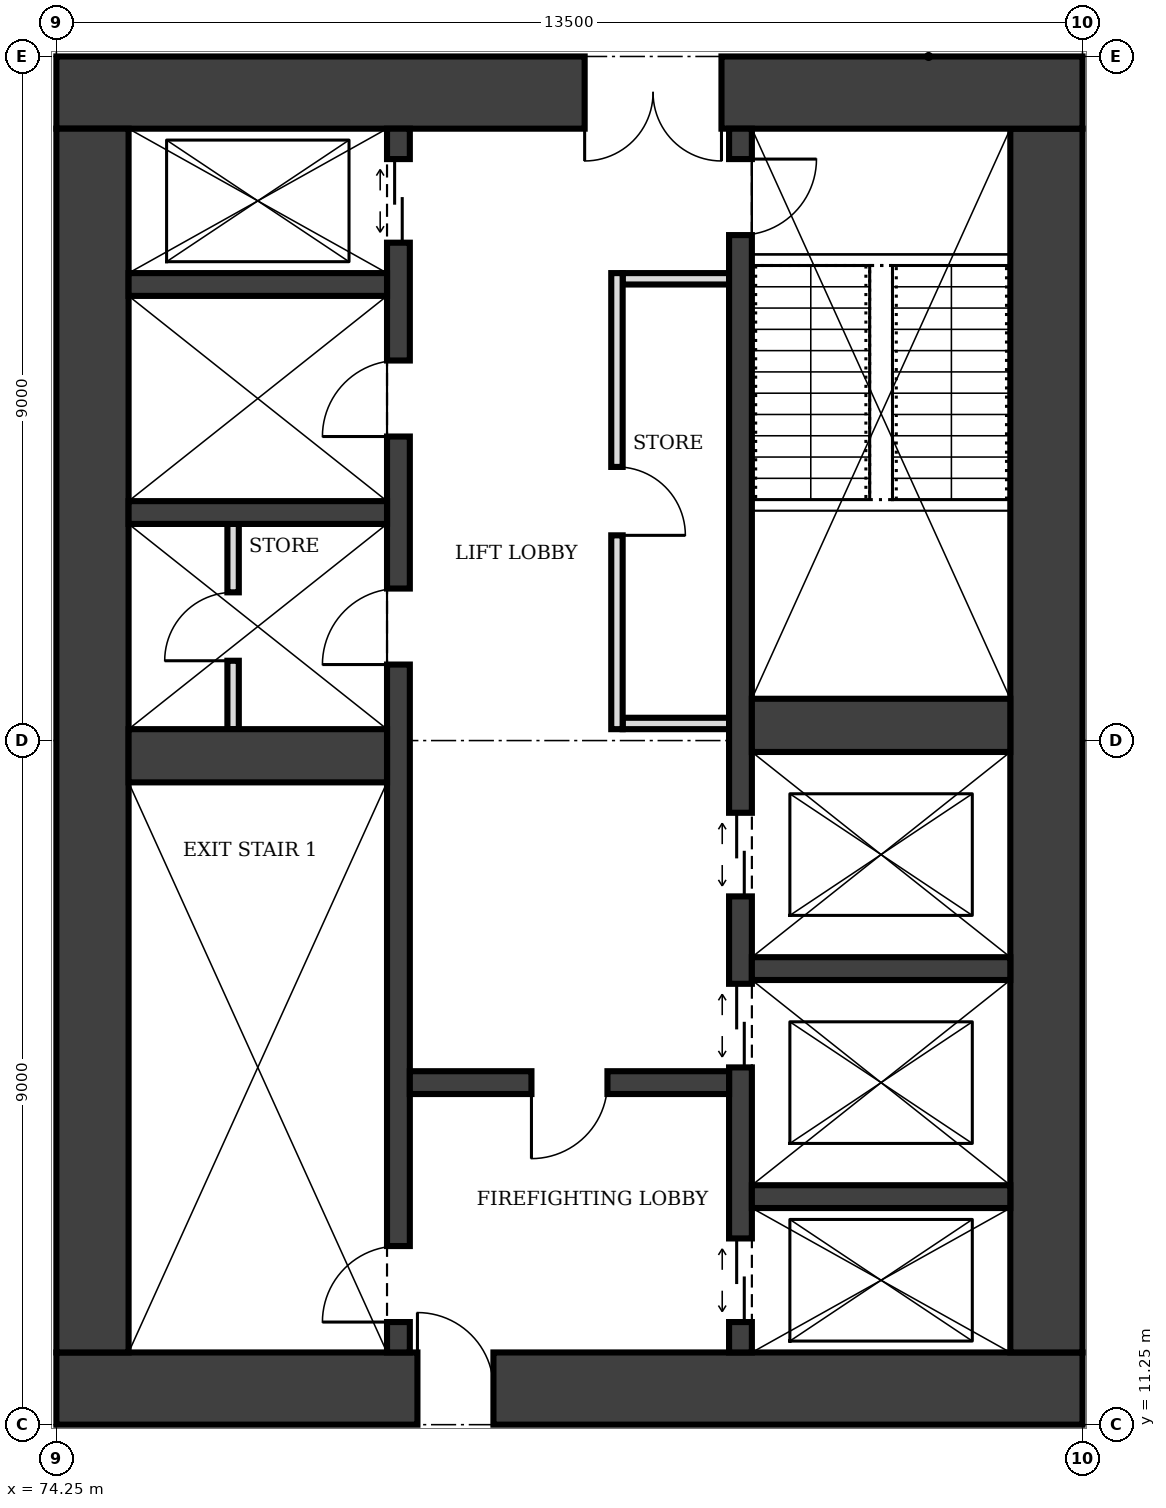
"""IFC4 building model, lengths in metres.
Left out: names, types, materials, properties, quantities, classifications, styles, units other than length and angle.
Written with IfcOpenShell. Run it as: python <this file> out.ifc"""

import sys

from ifc_helpers import new_model, si_unit, direction, frame, frame_2d, origin, place, context, subcontext, project, spatial, rectangle, extrude, element, fill, save


model = new_model("IFC4")
c1 = context("Model", 3, precision=1e-05, world=origin(), true_north=direction((0.0, 1.0)))
c2 = subcontext(c1, "Body", "Model", "MODEL_VIEW")
j1 = project(units=[si_unit("LENGTHUNIT", "METRE"), si_unit("PLANEANGLEUNIT", "RADIAN")], contexts=[c1])
p1 = place(None, origin())
s1 = spatial("IfcSite", under=j1, at=p1, CompositionType="ELEMENT")
p2 = place(p1, origin())
s2 = spatial("IfcBuilding", under=s1, at=p2, CompositionType="ELEMENT")
p3 = place(p2, frame((0.0, 0.0, 233.0)))
s3 = spatial("IfcBuildingStorey", under=s2, at=p3, CompositionType="ELEMENT", Elevation=233.0)
p4 = place(p3, frame((74.25, 11.725, 0.0), z_axis=(0.0, 0.0, 1.0), x_axis=(1.0, 0.0, 0.0)))
e1 = element("IfcWall", 1, at=p4, inside=s3, PredefinedType="SHEAR", context=c2, shape_type="SweptSolid", body=[
    extrude(rectangle(XDim=13.5, YDim=0.95, at=frame_2d((6.75, 0.0))), origin(), (0.0, 0.0, 1.0), 4.0),
])
p5 = place(p4, frame((4.75, 0.0, 0.0)))
e2 = element("IfcOpeningElement", 2, at=p5, cuts=e1, PredefinedType="OPENING", context=c2, shape_type="SweptSolid", body=[
    extrude(rectangle(XDim=1.0, YDim=2.1, at=frame_2d((0.5, 1.05))), frame((0.0, 0.485, 0.0), z_axis=(0.0, -1.0, 0.0), x_axis=(1.0, 0.0, 0.0)), (0.0, 0.0, 1.0), 0.97),
])
p6 = place(p3, frame((87.275, 12.2, 0.0), z_axis=(0.0, 0.0, 1.0), x_axis=(0.0, 1.0, 0.0)))
e3 = element("IfcWall", 3, at=p6, inside=s3, PredefinedType="SHEAR", context=c2, shape_type="SweptSolid", body=[
    extrude(rectangle(XDim=16.1, YDim=0.95, at=frame_2d((8.05, 0.0))), origin(), (0.0, 0.0, 1.0), 4.0),
])
p7 = place(p3, frame((87.75, 28.775, 0.0), z_axis=(0.0, 0.0, 1.0), x_axis=(-1.0, 0.0, 0.0)))
e4 = element("IfcWall", 4, at=p7, inside=s3, PredefinedType="SHEAR", context=c2, shape_type="SweptSolid", body=[
    extrude(rectangle(XDim=13.5, YDim=0.95, at=frame_2d((6.75, 0.0))), origin(), (0.0, 0.0, 1.0), 4.0),
])
p8 = place(p7, frame((4.75, 0.0, 0.0)))
e5 = element("IfcOpeningElement", 5, at=p8, cuts=e4, PredefinedType="OPENING", context=c2, shape_type="SweptSolid", body=[
    extrude(rectangle(XDim=1.8, YDim=2.1, at=frame_2d((0.9, 1.05))), frame((0.0, 0.485, 0.0), z_axis=(0.0, -1.0, 0.0), x_axis=(1.0, 0.0, 0.0)), (0.0, 0.0, 1.0), 0.97),
])
p9 = place(p3, frame((74.725, 28.3, 0.0), z_axis=(0.0, 0.0, 1.0), x_axis=(0.0, -1.0, 0.0)))
e6 = element("IfcWall", 6, at=p9, inside=s3, PredefinedType="SHEAR", context=c2, shape_type="SweptSolid", body=[
    extrude(rectangle(XDim=16.1, YDim=0.95, at=frame_2d((8.05, 0.0))), origin(), (0.0, 0.0, 1.0), 4.0),
])
p10 = place(p3, frame((78.75, 12.2, 0.0), z_axis=(0.0, 0.0, 1.0), x_axis=(0.0, 1.0, 0.0)))
e7 = element("IfcWall", 7, at=p10, inside=s3, PredefinedType="SHEAR", context=c2, shape_type="SweptSolid", body=[
    extrude(rectangle(XDim=16.1, YDim=0.3, at=frame_2d((8.05, 0.0))), origin(), (0.0, 0.0, 1.0), 4.0),
])
p11 = place(p10, frame((0.4, 0.0, 0.0)))
e8 = element("IfcOpeningElement", 8, at=p11, cuts=e7, PredefinedType="OPENING", context=c2, shape_type="SweptSolid", body=[
    extrude(rectangle(XDim=1.0, YDim=2.1, at=frame_2d((0.5, 1.05))), frame((0.0, 0.16, 0.0), z_axis=(0.0, -1.0, 0.0), x_axis=(1.0, 0.0, 0.0)), (0.0, 0.0, 1.0), 0.32),
])
p12 = place(p10, frame((14.6, 0.0, 0.0)))
e9 = element("IfcOpeningElement", 9, at=p12, cuts=e7, PredefinedType="OPENING", context=c2, shape_type="SweptSolid", body=[
    extrude(rectangle(XDim=1.1, YDim=2.1, at=frame_2d((0.55, 1.05))), frame((0.0, 0.16, 0.0), z_axis=(0.0, -1.0, 0.0), x_axis=(1.0, 0.0, 0.0)), (0.0, 0.0, 1.0), 0.32),
])
p13 = place(p10, frame((9.05, 0.0, 0.0)))
e10 = element("IfcOpeningElement", 10, at=p13, cuts=e7, PredefinedType="OPENING", context=c2, shape_type="SweptSolid", body=[
    extrude(rectangle(XDim=1.0, YDim=2.1, at=frame_2d((0.5, 1.05))), frame((0.0, 0.16, 0.0), z_axis=(0.0, -1.0, 0.0), x_axis=(1.0, 0.0, 0.0)), (0.0, 0.0, 1.0), 0.32),
])
p14 = place(p10, frame((12.05, 0.0, 0.0)))
e11 = element("IfcOpeningElement", 11, at=p14, cuts=e7, PredefinedType="OPENING", context=c2, shape_type="SweptSolid", body=[
    extrude(rectangle(XDim=1.0, YDim=2.1, at=frame_2d((0.5, 1.05))), frame((0.0, 0.16, 0.0), z_axis=(0.0, -1.0, 0.0), x_axis=(1.0, 0.0, 0.0)), (0.0, 0.0, 1.0), 0.32),
])
p15 = place(p3, frame((83.25, 12.2, 0.0), z_axis=(0.0, 0.0, 1.0), x_axis=(0.0, 1.0, 0.0)))
e12 = element("IfcWall", 12, at=p15, inside=s3, PredefinedType="SHEAR", context=c2, shape_type="SweptSolid", body=[
    extrude(rectangle(XDim=16.1, YDim=0.3, at=frame_2d((8.05, 0.0))), origin(), (0.0, 0.0, 1.0), 4.0),
])
p16 = place(p15, frame((14.7, 0.0, 0.0)))
e13 = element("IfcOpeningElement", 13, at=p16, cuts=e12, PredefinedType="OPENING", context=c2, shape_type="SweptSolid", body=[
    extrude(rectangle(XDim=1.0, YDim=2.1, at=frame_2d((0.5, 1.05))), frame((0.0, 0.16, 0.0), z_axis=(0.0, -1.0, 0.0), x_axis=(1.0, 0.0, 0.0)), (0.0, 0.0, 1.0), 0.32),
])
p17 = place(p15, frame((0.4, 0.0, 0.0)))
e14 = element("IfcOpeningElement", 14, at=p17, cuts=e12, PredefinedType="OPENING", context=c2, shape_type="SweptSolid", body=[
    extrude(rectangle(XDim=1.1, YDim=2.1, at=frame_2d((0.55, 1.05))), frame((0.0, 0.16, 0.0), z_axis=(0.0, -1.0, 0.0), x_axis=(1.0, 0.0, 0.0)), (0.0, 0.0, 1.0), 0.32),
])
p18 = place(p15, frame((3.75, 0.0, 0.0)))
e15 = element("IfcOpeningElement", 15, at=p18, cuts=e12, PredefinedType="OPENING", context=c2, shape_type="SweptSolid", body=[
    extrude(rectangle(XDim=1.1, YDim=2.1, at=frame_2d((0.55, 1.05))), frame((0.0, 0.16, 0.0), z_axis=(0.0, -1.0, 0.0), x_axis=(1.0, 0.0, 0.0)), (0.0, 0.0, 1.0), 0.32),
])
p19 = place(p15, frame((6.0, 0.0, 0.0)))
e16 = element("IfcOpeningElement", 16, at=p19, cuts=e12, PredefinedType="OPENING", context=c2, shape_type="SweptSolid", body=[
    extrude(rectangle(XDim=1.1, YDim=2.1, at=frame_2d((0.55, 1.05))), frame((0.0, 0.16, 0.0), z_axis=(0.0, -1.0, 0.0), x_axis=(1.0, 0.0, 0.0)), (0.0, 0.0, 1.0), 0.32),
])
p20 = place(p3, frame((75.2, 20.05, 0.0), z_axis=(0.0, 0.0, 1.0), x_axis=(1.0, 0.0, 0.0)))
e17 = element("IfcWall", 17, at=p20, inside=s3, PredefinedType="SHEAR", context=c2, shape_type="SweptSolid", body=[
    extrude(rectangle(XDim=3.4, YDim=0.7, at=frame_2d((1.7, 0.0))), origin(), (0.0, 0.0, 1.0), 4.0),
])
p21 = place(p3, frame((78.9, 15.75, 0.0), z_axis=(0.0, 0.0, 1.0), x_axis=(1.0, 0.0, 0.0)))
e18 = element("IfcWall", 18, at=p21, inside=s3, PredefinedType="SHEAR", context=c2, shape_type="SweptSolid", body=[
    extrude(rectangle(XDim=4.2, YDim=0.3, at=frame_2d((2.1, 0.0))), origin(), (0.0, 0.0, 1.0), 4.0),
])
p22 = place(p21, frame((1.6, 0.0, 0.0)))
e19 = element("IfcOpeningElement", 19, at=p22, cuts=e18, PredefinedType="OPENING", context=c2, shape_type="SweptSolid", body=[
    extrude(rectangle(XDim=1.0, YDim=2.1, at=frame_2d((0.5, 1.05))), frame((0.0, 0.16, 0.0), z_axis=(0.0, -1.0, 0.0), x_axis=(1.0, 0.0, 0.0)), (0.0, 0.0, 1.0), 0.32),
])
for number, where, z_axis, x_axis in (
    (20, (83.4, 14.25, 0.0), (0.0, 0.0, 1.0), (1.0, 0.0, 0.0)),
    (21, (83.4, 17.25, 0.0), (0.0, 0.0, 1.0), (1.0, 0.0, 0.0)),
):
    element("IfcWall", number, at=place(p3, frame(where, z_axis=z_axis, x_axis=x_axis)), inside=s3, PredefinedType="SHEAR", context=c2, shape_type="SweptSolid", body=[
        extrude(rectangle(XDim=3.4, YDim=0.3, at=frame_2d((1.7, 0.0))), origin(), (0.0, 0.0, 1.0), 4.0),
    ])
p23 = place(p3, frame((83.4, 20.45, 0.0), z_axis=(0.0, 0.0, 1.0), x_axis=(1.0, 0.0, 0.0)))
e22 = element("IfcWall", 22, at=p23, inside=s3, PredefinedType="SHEAR", context=c2, shape_type="SweptSolid", body=[
    extrude(rectangle(XDim=3.4, YDim=0.7, at=frame_2d((1.7, 0.0))), origin(), (0.0, 0.0, 1.0), 4.0),
])
for number, where, z_axis, x_axis in (
    (23, (75.2, 23.25, 0.0), (0.0, 0.0, 1.0), (1.0, 0.0, 0.0)),
    (24, (75.2, 26.25, 0.0), (0.0, 0.0, 1.0), (1.0, 0.0, 0.0)),
):
    element("IfcWall", number, at=place(p3, frame(where, z_axis=z_axis, x_axis=x_axis)), inside=s3, PredefinedType="SHEAR", context=c2, shape_type="SweptSolid", body=[
        extrude(rectangle(XDim=3.4, YDim=0.3, at=frame_2d((1.7, 0.0))), origin(), (0.0, 0.0, 1.0), 4.0),
    ])
p24 = place(p3, frame((81.625, 20.4, 0.0), z_axis=(0.0, 0.0, 1.0), x_axis=(0.0, 1.0, 0.0)))
e25 = element("IfcWall", 25, at=p24, inside=s3, PredefinedType="PARTITIONING", context=c2, shape_type="SweptSolid", body=[
    extrude(rectangle(XDim=6.0, YDim=0.15, at=frame_2d((3.0, 0.0))), origin(), (0.0, 0.0, 1.0), 3.75),
])
p25 = place(p24, frame((2.55, 0.0, 0.0)))
e26 = element("IfcOpeningElement", 26, at=p25, cuts=e25, PredefinedType="OPENING", context=c2, shape_type="SweptSolid", body=[
    extrude(rectangle(XDim=0.9, YDim=2.1, at=frame_2d((0.45, 1.05))), frame((0.0, 0.085, 0.0), z_axis=(0.0, -1.0, 0.0), x_axis=(1.0, 0.0, 0.0)), (0.0, 0.0, 1.0), 0.17),
])
for number, where, z_axis, x_axis in (
    (27, (81.7, 20.475, 0.0), (0.0, 0.0, 1.0), (1.0, 0.0, 0.0)),
    (28, (81.7, 26.325, 0.0), (0.0, 0.0, 1.0), (1.0, 0.0, 0.0)),
):
    element("IfcWall", number, at=place(p3, frame(where, z_axis=z_axis, x_axis=x_axis)), inside=s3, PredefinedType="PARTITIONING", context=c2, shape_type="SweptSolid", body=[
        extrude(rectangle(XDim=1.4, YDim=0.15, at=frame_2d((0.7, 0.0))), origin(), (0.0, 0.0, 1.0), 3.75),
    ])
p26 = place(p3, frame((76.575, 20.4, 0.0), z_axis=(0.0, 0.0, 1.0), x_axis=(0.0, 1.0, 0.0)))
e29 = element("IfcWall", 29, at=p26, inside=s3, PredefinedType="PARTITIONING", context=c2, shape_type="SweptSolid", body=[
    extrude(rectangle(XDim=2.7, YDim=0.15, at=frame_2d((1.35, 0.0))), origin(), (0.0, 0.0, 1.0), 3.75),
])
p27 = place(p26, frame((0.9, 0.0, 0.0)))
e30 = element("IfcOpeningElement", 30, at=p27, cuts=e29, PredefinedType="OPENING", context=c2, shape_type="SweptSolid", body=[
    extrude(rectangle(XDim=0.9, YDim=2.1, at=frame_2d((0.45, 1.05))), frame((0.0, 0.085, 0.0), z_axis=(0.0, -1.0, 0.0), x_axis=(1.0, 0.0, 0.0)), (0.0, 0.0, 1.0), 0.17),
])
p28 = place(p5, origin())
e31 = element("IfcDoor", 31, at=p28, inside=s3, OperationType="SINGLE_SWING_LEFT", PredefinedType="DOOR", context=c2, shape_type="SweptSolid", body=[
    extrude(rectangle(XDim=1.0, YDim=2.1, at=frame_2d((0.5, 1.05))), frame((0.0, 0.025, 0.0), z_axis=(0.0, -1.0, 0.0), x_axis=(1.0, 0.0, 0.0)), (0.0, 0.0, 1.0), 0.05),
])
fill(e2, e31)
p29 = place(p8, origin())
e32 = element("IfcDoor", 32, at=p29, inside=s3, OperationType="DOUBLE_DOOR_SINGLE_SWING", PredefinedType="DOOR", context=c2, shape_type="SweptSolid", body=[
    extrude(rectangle(XDim=1.8, YDim=2.1, at=frame_2d((0.9, 1.05))), frame((0.0, 0.025, 0.0), z_axis=(0.0, -1.0, 0.0), x_axis=(1.0, 0.0, 0.0)), (0.0, 0.0, 1.0), 0.05),
])
fill(e5, e32)
p30 = place(p22, frame((1.0, 0.0, 0.0), z_axis=(0.0, 0.0, 1.0), x_axis=(-1.0, 0.0, 0.0)))
e33 = element("IfcDoor", 33, at=p30, inside=s3, OperationType="SINGLE_SWING_RIGHT", PredefinedType="DOOR", context=c2, shape_type="SweptSolid", body=[
    extrude(rectangle(XDim=1.0, YDim=2.1, at=frame_2d((0.5, 1.05))), frame((0.0, 0.025, 0.0), z_axis=(0.0, -1.0, 0.0), x_axis=(1.0, 0.0, 0.0)), (0.0, 0.0, 1.0), 0.05),
])
fill(e19, e33)
p31 = place(p11, origin())
e34 = element("IfcDoor", 34, at=p31, inside=s3, OperationType="SINGLE_SWING_LEFT", PredefinedType="DOOR", context=c2, shape_type="SweptSolid", body=[
    extrude(rectangle(XDim=1.0, YDim=2.1, at=frame_2d((0.5, 1.05))), frame((0.0, 0.025, 0.0), z_axis=(0.0, -1.0, 0.0), x_axis=(1.0, 0.0, 0.0)), (0.0, 0.0, 1.0), 0.05),
])
fill(e8, e34)
p32 = place(p16, frame((1.0, 0.0, 0.0), z_axis=(0.0, 0.0, 1.0), x_axis=(-1.0, 0.0, 0.0)))
e35 = element("IfcDoor", 35, at=p32, inside=s3, OperationType="SINGLE_SWING_LEFT", PredefinedType="DOOR", context=c2, shape_type="SweptSolid", body=[
    extrude(rectangle(XDim=1.0, YDim=2.1, at=frame_2d((0.5, 1.05))), frame((0.0, 0.025, 0.0), z_axis=(0.0, -1.0, 0.0), x_axis=(1.0, 0.0, 0.0)), (0.0, 0.0, 1.0), 0.05),
])
fill(e13, e35)
p33 = place(p17, origin())
e36 = element("IfcDoor", 36, at=p33, inside=s3, OperationType="DOUBLE_DOOR_SLIDING", PredefinedType="DOOR", context=c2, shape_type="SweptSolid", body=[
    extrude(rectangle(XDim=1.1, YDim=2.1, at=frame_2d((0.55, 1.05))), frame((0.0, 0.025, 0.0), z_axis=(0.0, -1.0, 0.0), x_axis=(1.0, 0.0, 0.0)), (0.0, 0.0, 1.0), 0.05),
])
fill(e14, e36)
p34 = place(p12, origin())
e37 = element("IfcDoor", 37, at=p34, inside=s3, OperationType="DOUBLE_DOOR_SLIDING", PredefinedType="DOOR", context=c2, shape_type="SweptSolid", body=[
    extrude(rectangle(XDim=1.1, YDim=2.1, at=frame_2d((0.55, 1.05))), frame((0.0, 0.025, 0.0), z_axis=(0.0, -1.0, 0.0), x_axis=(1.0, 0.0, 0.0)), (0.0, 0.0, 1.0), 0.05),
])
fill(e9, e37)
p35 = place(p18, origin())
e38 = element("IfcDoor", 38, at=p35, inside=s3, OperationType="DOUBLE_DOOR_SLIDING", PredefinedType="DOOR", context=c2, shape_type="SweptSolid", body=[
    extrude(rectangle(XDim=1.1, YDim=2.1, at=frame_2d((0.55, 1.05))), frame((0.0, 0.025, 0.0), z_axis=(0.0, -1.0, 0.0), x_axis=(1.0, 0.0, 0.0)), (0.0, 0.0, 1.0), 0.05),
])
fill(e15, e38)
p36 = place(p19, origin())
e39 = element("IfcDoor", 39, at=p36, inside=s3, OperationType="DOUBLE_DOOR_SLIDING", PredefinedType="DOOR", context=c2, shape_type="SweptSolid", body=[
    extrude(rectangle(XDim=1.1, YDim=2.1, at=frame_2d((0.55, 1.05))), frame((0.0, 0.025, 0.0), z_axis=(0.0, -1.0, 0.0), x_axis=(1.0, 0.0, 0.0)), (0.0, 0.0, 1.0), 0.05),
])
fill(e16, e39)
p37 = place(p25, frame((0.9, 0.0, 0.0), z_axis=(0.0, 0.0, 1.0), x_axis=(-1.0, 0.0, 0.0)))
e40 = element("IfcDoor", 40, at=p37, inside=s3, OperationType="SINGLE_SWING_RIGHT", PredefinedType="DOOR", context=c2, shape_type="SweptSolid", body=[
    extrude(rectangle(XDim=0.9, YDim=2.1, at=frame_2d((0.45, 1.05))), frame((0.0, 0.025, 0.0), z_axis=(0.0, -1.0, 0.0), x_axis=(1.0, 0.0, 0.0)), (0.0, 0.0, 1.0), 0.05),
])
fill(e26, e40)
p38 = place(p13, origin())
e41 = element("IfcDoor", 41, at=p38, inside=s3, OperationType="SINGLE_SWING_LEFT", PredefinedType="DOOR", context=c2, shape_type="SweptSolid", body=[
    extrude(rectangle(XDim=1.0, YDim=2.1, at=frame_2d((0.5, 1.05))), frame((0.0, 0.025, 0.0), z_axis=(0.0, -1.0, 0.0), x_axis=(1.0, 0.0, 0.0)), (0.0, 0.0, 1.0), 0.05),
])
fill(e10, e41)
p39 = place(p27, origin())
e42 = element("IfcDoor", 42, at=p39, inside=s3, OperationType="SINGLE_SWING_LEFT", PredefinedType="DOOR", context=c2, shape_type="SweptSolid", body=[
    extrude(rectangle(XDim=0.9, YDim=2.1, at=frame_2d((0.45, 1.05))), frame((0.0, 0.025, 0.0), z_axis=(0.0, -1.0, 0.0), x_axis=(1.0, 0.0, 0.0)), (0.0, 0.0, 1.0), 0.05),
])
fill(e30, e42)
p40 = place(p14, origin())
e43 = element("IfcDoor", 43, at=p40, inside=s3, OperationType="SINGLE_SWING_LEFT", PredefinedType="DOOR", context=c2, shape_type="SweptSolid", body=[
    extrude(rectangle(XDim=1.0, YDim=2.1, at=frame_2d((0.5, 1.05))), frame((0.0, 0.025, 0.0), z_axis=(0.0, -1.0, 0.0), x_axis=(1.0, 0.0, 0.0)), (0.0, 0.0, 1.0), 0.05),
])
fill(e11, e43)
save(model, sys.argv[1])
